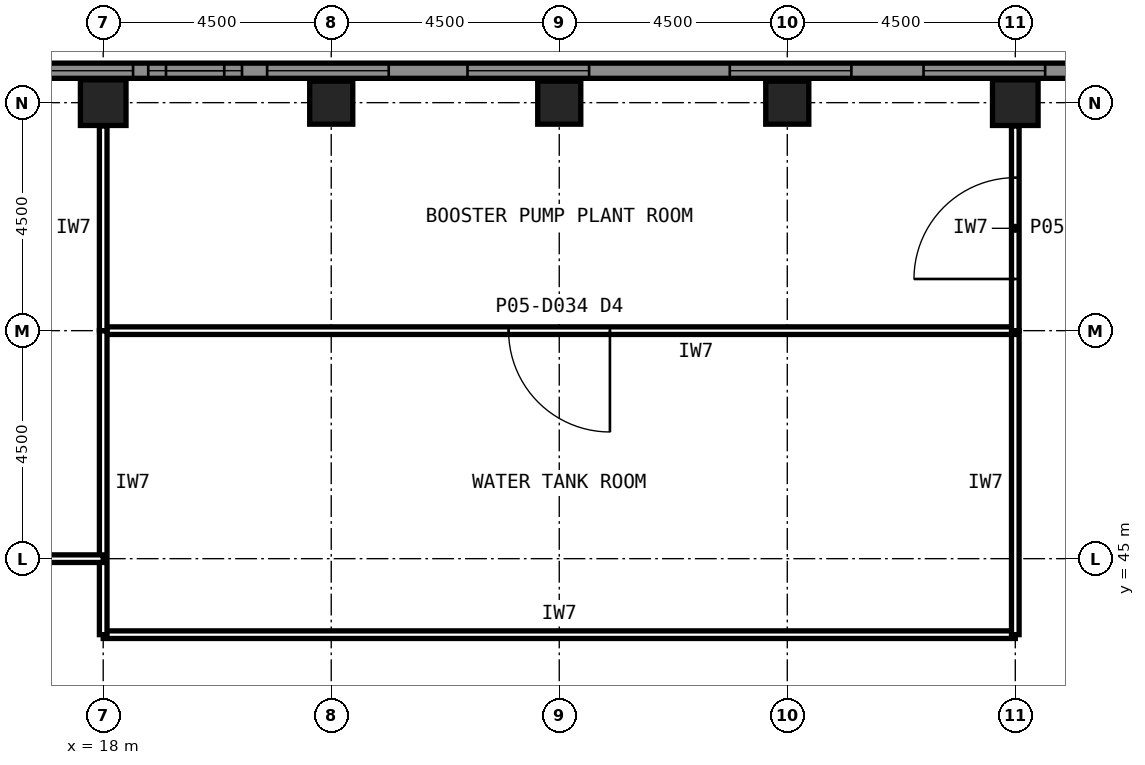
"""IFC4 building model, lengths in metres.
Left out: names, types, materials, properties, quantities, classifications, styles, units other than length and angle.
Written with IfcOpenShell. Run it as: python <this file> out.ifc"""

import sys

from ifc_helpers import new_model, si_unit, direction, frame, frame_2d, origin, origin_2d, place, context, subcontext, project, spatial, rectangle, hollow_rectangle, extrude, element, fill, save


model = new_model("IFC4")
c1 = context("Model", 3, precision=1e-05, world=origin(), true_north=direction((0.0, 1.0)))
c2 = subcontext(c1, "Body", "Model", "MODEL_VIEW")
j1 = project(units=[si_unit("LENGTHUNIT", "METRE"), si_unit("PLANEANGLEUNIT", "RADIAN")], contexts=[c1])
p1 = place(None, origin())
s1 = spatial("IfcSite", under=j1, at=p1, CompositionType="ELEMENT")
p2 = place(p1, origin())
s2 = spatial("IfcBuilding", under=s1, at=p2, CompositionType="ELEMENT")
p3 = place(p2, frame((0.0, 0.0, 23.0)))
s3 = spatial("IfcBuildingStorey", under=s2, at=p3, CompositionType="ELEMENT", Elevation=23.0)
p4 = place(p3, frame((36.0, 54.0, 0.0), z_axis=(0.0, 0.0, 1.0), x_axis=(1.0, 0.0, 0.0)))
e1 = element("IfcColumn", 1, at=p4, inside=s3, PredefinedType="COLUMN", context=c2, shape_type="SweptSolid", body=[
    extrude(hollow_rectangle(XDim=0.9, YDim=0.9, WallThickness=0.063, at=origin_2d()), origin(), (0.0, 0.0, 1.0), 6.0),
])
for number, where, z_axis, x_axis in (
    (2, (31.5, 54.0, 0.0), (0.0, 0.0, 1.0), (1.0, 0.0, 0.0)),
    (3, (27.0, 54.0, 0.0), (0.0, 0.0, 1.0), (1.0, 0.0, 0.0)),
    (4, (22.5, 54.0, 0.0), (0.0, 0.0, 1.0), (1.0, 0.0, 0.0)),
):
    element("IfcColumn", number, at=place(p3, frame(where, z_axis=z_axis, x_axis=x_axis)), inside=s3, PredefinedType="COLUMN", context=c2, shape_type="SweptSolid", body=[
        extrude(hollow_rectangle(XDim=0.85, YDim=0.85, WallThickness=0.05, at=origin_2d()), origin(), (0.0, 0.0, 1.0), 6.0),
    ])
p5 = place(p3, frame((18.0, 54.0, 0.0), z_axis=(0.0, 0.0, 1.0), x_axis=(1.0, 0.0, 0.0)))
e5 = element("IfcColumn", 5, at=p5, inside=s3, PredefinedType="COLUMN", context=c2, shape_type="SweptSolid", body=[
    extrude(hollow_rectangle(XDim=0.9, YDim=0.9, WallThickness=0.063, at=origin_2d()), origin(), (0.0, 0.0, 1.0), 6.0),
])
p6 = place(p3, frame((8.739, 54.63, 0.0), z_axis=(0.0, 0.0, 1.0), x_axis=(1.0, 0.0, 0.0)))
e6 = element("IfcWall", 6, at=p6, inside=s3, PredefinedType="SOLIDWALL", context=c2, shape_type="SweptSolid", body=[
    extrude(rectangle(XDim=36.522, YDim=0.3, at=frame_2d((18.261, 0.0))), origin(), (0.0, 0.0, 1.0), 6.0),
])
p7 = place(p6, frame((0.3, 0.0, 0.3)))
e7 = element("IfcOpeningElement", 7, at=p7, cuts=e6, PredefinedType="OPENING", context=c2, shape_type="SweptSolid", body=[
    extrude(rectangle(XDim=1.5, YDim=2.0, at=frame_2d((0.75, 1.0))), frame((0.0, 0.16, 0.0), z_axis=(0.0, -1.0, 0.0), x_axis=(1.0, 0.0, 0.0)), (0.0, 0.0, 1.0), 0.32),
])
p8 = place(p6, frame((3.365, 0.0, 1.2)))
e8 = element("IfcOpeningElement", 8, at=p8, cuts=e6, PredefinedType="OPENING", context=c2, shape_type="SweptSolid", body=[
    extrude(rectangle(XDim=2.4, YDim=3.0, at=frame_2d((1.2, 1.5))), frame((0.0, 0.16, 0.0), z_axis=(0.0, -1.0, 0.0), x_axis=(1.0, 0.0, 0.0)), (0.0, 0.0, 1.0), 0.32),
])
p9 = place(p6, frame((1.5, 0.0, 3.65)))
e9 = element("IfcOpeningElement", 9, at=p9, cuts=e6, PredefinedType="OPENING", context=c2, shape_type="SweptSolid", body=[
    extrude(rectangle(XDim=1.5, YDim=2.0, at=frame_2d((0.75, 1.0))), frame((0.0, 0.16, 0.0), z_axis=(0.0, -1.0, 0.0), x_axis=(1.0, 0.0, 0.0)), (0.0, 0.0, 1.0), 0.32),
])
p10 = place(p6, frame((6.1, 0.0, 3.6)))
e10 = element("IfcOpeningElement", 10, at=p10, cuts=e6, PredefinedType="OPENING", context=c2, shape_type="SweptSolid", body=[
    extrude(rectangle(XDim=1.5, YDim=2.0, at=frame_2d((0.75, 1.0))), frame((0.0, 0.16, 0.0), z_axis=(0.0, -1.0, 0.0), x_axis=(1.0, 0.0, 0.0)), (0.0, 0.0, 1.0), 0.32),
])
p11 = place(p6, frame((12.496, 0.0, 1.2)))
e11 = element("IfcOpeningElement", 11, at=p11, cuts=e6, PredefinedType="OPENING", context=c2, shape_type="SweptSolid", body=[
    extrude(rectangle(XDim=2.4, YDim=3.0, at=frame_2d((1.2, 1.5))), frame((0.0, 0.16, 0.0), z_axis=(0.0, -1.0, 0.0), x_axis=(1.0, 0.0, 0.0)), (0.0, 0.0, 1.0), 0.32),
])
p12 = place(p6, frame((7.45, 0.0, 0.3)))
e12 = element("IfcOpeningElement", 12, at=p12, cuts=e6, PredefinedType="OPENING", context=c2, shape_type="SweptSolid", body=[
    extrude(rectangle(XDim=2.4, YDim=3.0, at=frame_2d((1.2, 1.5))), frame((0.0, 0.16, 0.0), z_axis=(0.0, -1.0, 0.0), x_axis=(1.0, 0.0, 0.0)), (0.0, 0.0, 1.0), 0.32),
])
p13 = place(p6, frame((10.15, 0.0, 0.3)))
e13 = element("IfcOpeningElement", 13, at=p13, cuts=e6, PredefinedType="OPENING", context=c2, shape_type="SweptSolid", body=[
    extrude(rectangle(XDim=1.5, YDim=2.0, at=frame_2d((0.75, 1.0))), frame((0.0, 0.16, 0.0), z_axis=(0.0, -1.0, 0.0), x_axis=(1.0, 0.0, 0.0)), (0.0, 0.0, 1.0), 0.32),
])
p14 = place(p6, frame((21.626, 0.0, 1.2)))
e14 = element("IfcOpeningElement", 14, at=p14, cuts=e6, PredefinedType="OPENING", context=c2, shape_type="SweptSolid", body=[
    extrude(rectangle(XDim=2.4, YDim=3.0, at=frame_2d((1.2, 1.5))), frame((0.0, 0.16, 0.0), z_axis=(0.0, -1.0, 0.0), x_axis=(1.0, 0.0, 0.0)), (0.0, 0.0, 1.0), 0.32),
])
p15 = place(p6, frame((10.5, 0.0, 3.65)))
e15 = element("IfcOpeningElement", 15, at=p15, cuts=e6, PredefinedType="OPENING", context=c2, shape_type="SweptSolid", body=[
    extrude(rectangle(XDim=1.5, YDim=2.0, at=frame_2d((0.75, 1.0))), frame((0.0, 0.16, 0.0), z_axis=(0.0, -1.0, 0.0), x_axis=(1.0, 0.0, 0.0)), (0.0, 0.0, 1.0), 0.32),
])
p16 = place(p6, frame((16.45, 0.0, 0.3)))
e16 = element("IfcOpeningElement", 16, at=p16, cuts=e6, PredefinedType="OPENING", context=c2, shape_type="SweptSolid", body=[
    extrude(rectangle(XDim=2.4, YDim=3.0, at=frame_2d((1.2, 1.5))), frame((0.0, 0.16, 0.0), z_axis=(0.0, -1.0, 0.0), x_axis=(1.0, 0.0, 0.0)), (0.0, 0.0, 1.0), 0.32),
])
p17 = place(p6, frame((30.757, 0.0, 1.2)))
e17 = element("IfcOpeningElement", 17, at=p17, cuts=e6, PredefinedType="OPENING", context=c2, shape_type="SweptSolid", body=[
    extrude(rectangle(XDim=2.4, YDim=3.0, at=frame_2d((1.2, 1.5))), frame((0.0, 0.16, 0.0), z_axis=(0.0, -1.0, 0.0), x_axis=(1.0, 0.0, 0.0)), (0.0, 0.0, 1.0), 0.32),
])
p18 = place(p6, frame((25.45, 0.0, 0.3)))
e18 = element("IfcOpeningElement", 18, at=p18, cuts=e6, PredefinedType="OPENING", context=c2, shape_type="SweptSolid", body=[
    extrude(rectangle(XDim=2.4, YDim=3.0, at=frame_2d((1.2, 1.5))), frame((0.0, 0.16, 0.0), z_axis=(0.0, -1.0, 0.0), x_axis=(1.0, 0.0, 0.0)), (0.0, 0.0, 1.0), 0.32),
])
p19 = place(p3, frame((18.0, 43.5, 0.0), z_axis=(0.0, 0.0, 1.0), x_axis=(1.0, 0.0, 0.0)))
e19 = element("IfcWall", 19, at=p19, inside=s3, PredefinedType="PARTITIONING", context=c2, shape_type="SweptSolid", body=[
    extrude(rectangle(XDim=18.0, YDim=0.15, at=frame_2d((9.0, 0.0))), origin(), (0.0, 0.0, 1.0), 5.84),
])
p20 = place(p3, frame((36.0, 43.5, 0.0), z_axis=(0.0, 0.0, 1.0), x_axis=(0.0, 1.0, 0.0)))
e20 = element("IfcWall", 20, at=p20, inside=s3, PredefinedType="PARTITIONING", context=c2, shape_type="SweptSolid", body=[
    extrude(rectangle(XDim=6.0, YDim=0.15, at=frame_2d((3.0, 0.0))), origin(), (0.0, 0.0, 1.0), 4.989),
])
p21 = place(p3, frame((36.0, 49.5, 0.0), z_axis=(0.0, 0.0, 1.0), x_axis=(-1.0, 0.0, 0.0)))
e21 = element("IfcWall", 21, at=p21, inside=s3, PredefinedType="PARTITIONING", context=c2, shape_type="SweptSolid", body=[
    extrude(rectangle(XDim=18.0, YDim=0.15, at=frame_2d((9.0, 0.0))), origin(), (0.0, 0.0, 1.0), 5.84),
])
p22 = place(p21, frame((8.0, 0.0, 0.0)))
e22 = element("IfcOpeningElement", 22, at=p22, cuts=e21, PredefinedType="OPENING", context=c2, shape_type="SweptSolid", body=[
    extrude(rectangle(XDim=2.0, YDim=2.4, at=frame_2d((1.0, 1.2))), frame((0.0, 0.085, 0.0), z_axis=(0.0, -1.0, 0.0), x_axis=(1.0, 0.0, 0.0)), (0.0, 0.0, 1.0), 0.17),
])
p23 = place(p3, frame((18.0, 49.5, 0.0), z_axis=(0.0, 0.0, 1.0), x_axis=(0.0, -1.0, 0.0)))
e23 = element("IfcWall", 23, at=p23, inside=s3, PredefinedType="PARTITIONING", context=c2, shape_type="SweptSolid", body=[
    extrude(rectangle(XDim=6.0, YDim=0.15, at=frame_2d((3.0, 0.0))), origin(), (0.0, 0.0, 1.0), 4.989),
])
p24 = place(p3, frame((0.435, 45.0, 0.0), z_axis=(0.0, 0.0, 1.0), x_axis=(1.0, 0.0, 0.0)))
e24 = element("IfcWall", 24, at=p24, inside=s3, PredefinedType="PARTITIONING", context=c2, shape_type="SweptSolid", body=[
    extrude(rectangle(XDim=17.565, YDim=0.15, at=frame_2d((8.782, 0.0))), origin(), (0.0, 0.0, 1.0), 5.229),
])
p25 = place(p24, frame((9.5, 0.0, 0.0)))
e25 = element("IfcOpeningElement", 25, at=p25, cuts=e24, PredefinedType="OPENING", context=c2, shape_type="SweptSolid", body=[
    extrude(rectangle(XDim=2.0, YDim=2.4, at=frame_2d((1.0, 1.2))), frame((0.0, 0.085, 0.0), z_axis=(0.0, -1.0, 0.0), x_axis=(1.0, 0.0, 0.0)), (0.0, 0.0, 1.0), 0.17),
])
p26 = place(p3, frame((18.0, 49.5, 0.0), z_axis=(0.0, 0.0, 1.0), x_axis=(0.0, 1.0, 0.0)))
e26 = element("IfcWall", 26, at=p26, inside=s3, PredefinedType="PARTITIONING", context=c2, shape_type="SweptSolid", body=[
    extrude(rectangle(XDim=4.04, YDim=0.15, at=frame_2d((2.02, 0.0))), origin(), (0.0, 0.0, 1.0), 4.989),
])
p27 = place(p3, frame((36.0, 49.5, 0.0), z_axis=(0.0, 0.0, 1.0), x_axis=(0.0, 1.0, 0.0)))
e27 = element("IfcWall", 27, at=p27, inside=s3, PredefinedType="PARTITIONING", context=c2, shape_type="SweptSolid", body=[
    extrude(rectangle(XDim=4.04, YDim=0.15, at=frame_2d((2.02, 0.0))), origin(), (0.0, 0.0, 1.0), 4.989),
])
p28 = place(p27, frame((1.02, 0.0, 0.0)))
e28 = element("IfcOpeningElement", 28, at=p28, cuts=e27, PredefinedType="OPENING", context=c2, shape_type="SweptSolid", body=[
    extrude(rectangle(XDim=2.0, YDim=2.4, at=frame_2d((1.0, 1.2))), frame((0.0, 0.085, 0.0), z_axis=(0.0, -1.0, 0.0), x_axis=(1.0, 0.0, 0.0)), (0.0, 0.0, 1.0), 0.17),
])
p29 = place(p11, origin())
e29 = element("IfcWindow", 29, at=p29, inside=s3, PartitioningType="SINGLE_PANEL", PredefinedType="USERDEFINED", context=c2, shape_type="SweptSolid", body=[
    extrude(rectangle(XDim=2.4, YDim=3.0, at=frame_2d((1.2, 1.5))), frame((0.0, 0.03, 0.0), z_axis=(0.0, -1.0, 0.0), x_axis=(1.0, 0.0, 0.0)), (0.0, 0.0, 1.0), 0.06),
])
fill(e11, e29)
p30 = place(p12, origin())
e30 = element("IfcWindow", 30, at=p30, inside=s3, PartitioningType="SINGLE_PANEL", PredefinedType="USERDEFINED", context=c2, shape_type="SweptSolid", body=[
    extrude(rectangle(XDim=2.4, YDim=3.0, at=frame_2d((1.2, 1.5))), frame((0.0, 0.03, 0.0), z_axis=(0.0, -1.0, 0.0), x_axis=(1.0, 0.0, 0.0)), (0.0, 0.0, 1.0), 0.06),
])
fill(e12, e30)
p31 = place(p13, origin())
e31 = element("IfcWindow", 31, at=p31, inside=s3, PartitioningType="SINGLE_PANEL", PredefinedType="USERDEFINED", context=c2, shape_type="SweptSolid", body=[
    extrude(rectangle(XDim=1.5, YDim=2.0, at=frame_2d((0.75, 1.0))), frame((0.0, 0.03, 0.0), z_axis=(0.0, -1.0, 0.0), x_axis=(1.0, 0.0, 0.0)), (0.0, 0.0, 1.0), 0.06),
])
fill(e13, e31)
p32 = place(p14, origin())
e32 = element("IfcWindow", 32, at=p32, inside=s3, PartitioningType="SINGLE_PANEL", PredefinedType="USERDEFINED", context=c2, shape_type="SweptSolid", body=[
    extrude(rectangle(XDim=2.4, YDim=3.0, at=frame_2d((1.2, 1.5))), frame((0.0, 0.03, 0.0), z_axis=(0.0, -1.0, 0.0), x_axis=(1.0, 0.0, 0.0)), (0.0, 0.0, 1.0), 0.06),
])
fill(e14, e32)
p33 = place(p15, origin())
e33 = element("IfcWindow", 33, at=p33, inside=s3, PartitioningType="SINGLE_PANEL", PredefinedType="USERDEFINED", context=c2, shape_type="SweptSolid", body=[
    extrude(rectangle(XDim=1.5, YDim=2.0, at=frame_2d((0.75, 1.0))), frame((0.0, 0.03, 0.0), z_axis=(0.0, -1.0, 0.0), x_axis=(1.0, 0.0, 0.0)), (0.0, 0.0, 1.0), 0.06),
])
fill(e15, e33)
p34 = place(p16, origin())
e34 = element("IfcWindow", 34, at=p34, inside=s3, PartitioningType="SINGLE_PANEL", PredefinedType="USERDEFINED", context=c2, shape_type="SweptSolid", body=[
    extrude(rectangle(XDim=2.4, YDim=3.0, at=frame_2d((1.2, 1.5))), frame((0.0, 0.03, 0.0), z_axis=(0.0, -1.0, 0.0), x_axis=(1.0, 0.0, 0.0)), (0.0, 0.0, 1.0), 0.06),
])
fill(e16, e34)
p35 = place(p18, origin())
e35 = element("IfcWindow", 35, at=p35, inside=s3, PartitioningType="SINGLE_PANEL", PredefinedType="USERDEFINED", context=c2, shape_type="SweptSolid", body=[
    extrude(rectangle(XDim=2.4, YDim=3.0, at=frame_2d((1.2, 1.5))), frame((0.0, 0.03, 0.0), z_axis=(0.0, -1.0, 0.0), x_axis=(1.0, 0.0, 0.0)), (0.0, 0.0, 1.0), 0.06),
])
fill(e18, e35)
p36 = place(p22, origin())
e36 = element("IfcDoor", 36, at=p36, inside=s3, OperationType="SINGLE_SWING_LEFT", PredefinedType="DOOR", context=c2, shape_type="SweptSolid", body=[
    extrude(rectangle(XDim=2.0, YDim=2.4, at=frame_2d((1.0, 1.2))), frame((0.0, 0.025, 0.0), z_axis=(0.0, -1.0, 0.0), x_axis=(1.0, 0.0, 0.0)), (0.0, 0.0, 1.0), 0.05),
])
fill(e22, e36)
p37 = place(p28, origin())
e37 = element("IfcDoor", 37, at=p37, inside=s3, OperationType="SINGLE_SWING_LEFT", PredefinedType="DOOR", context=c2, shape_type="SweptSolid", body=[
    extrude(rectangle(XDim=2.0, YDim=2.4, at=frame_2d((1.0, 1.2))), frame((0.0, 0.025, 0.0), z_axis=(0.0, -1.0, 0.0), x_axis=(1.0, 0.0, 0.0)), (0.0, 0.0, 1.0), 0.05),
])
fill(e28, e37)
save(model, sys.argv[1])
